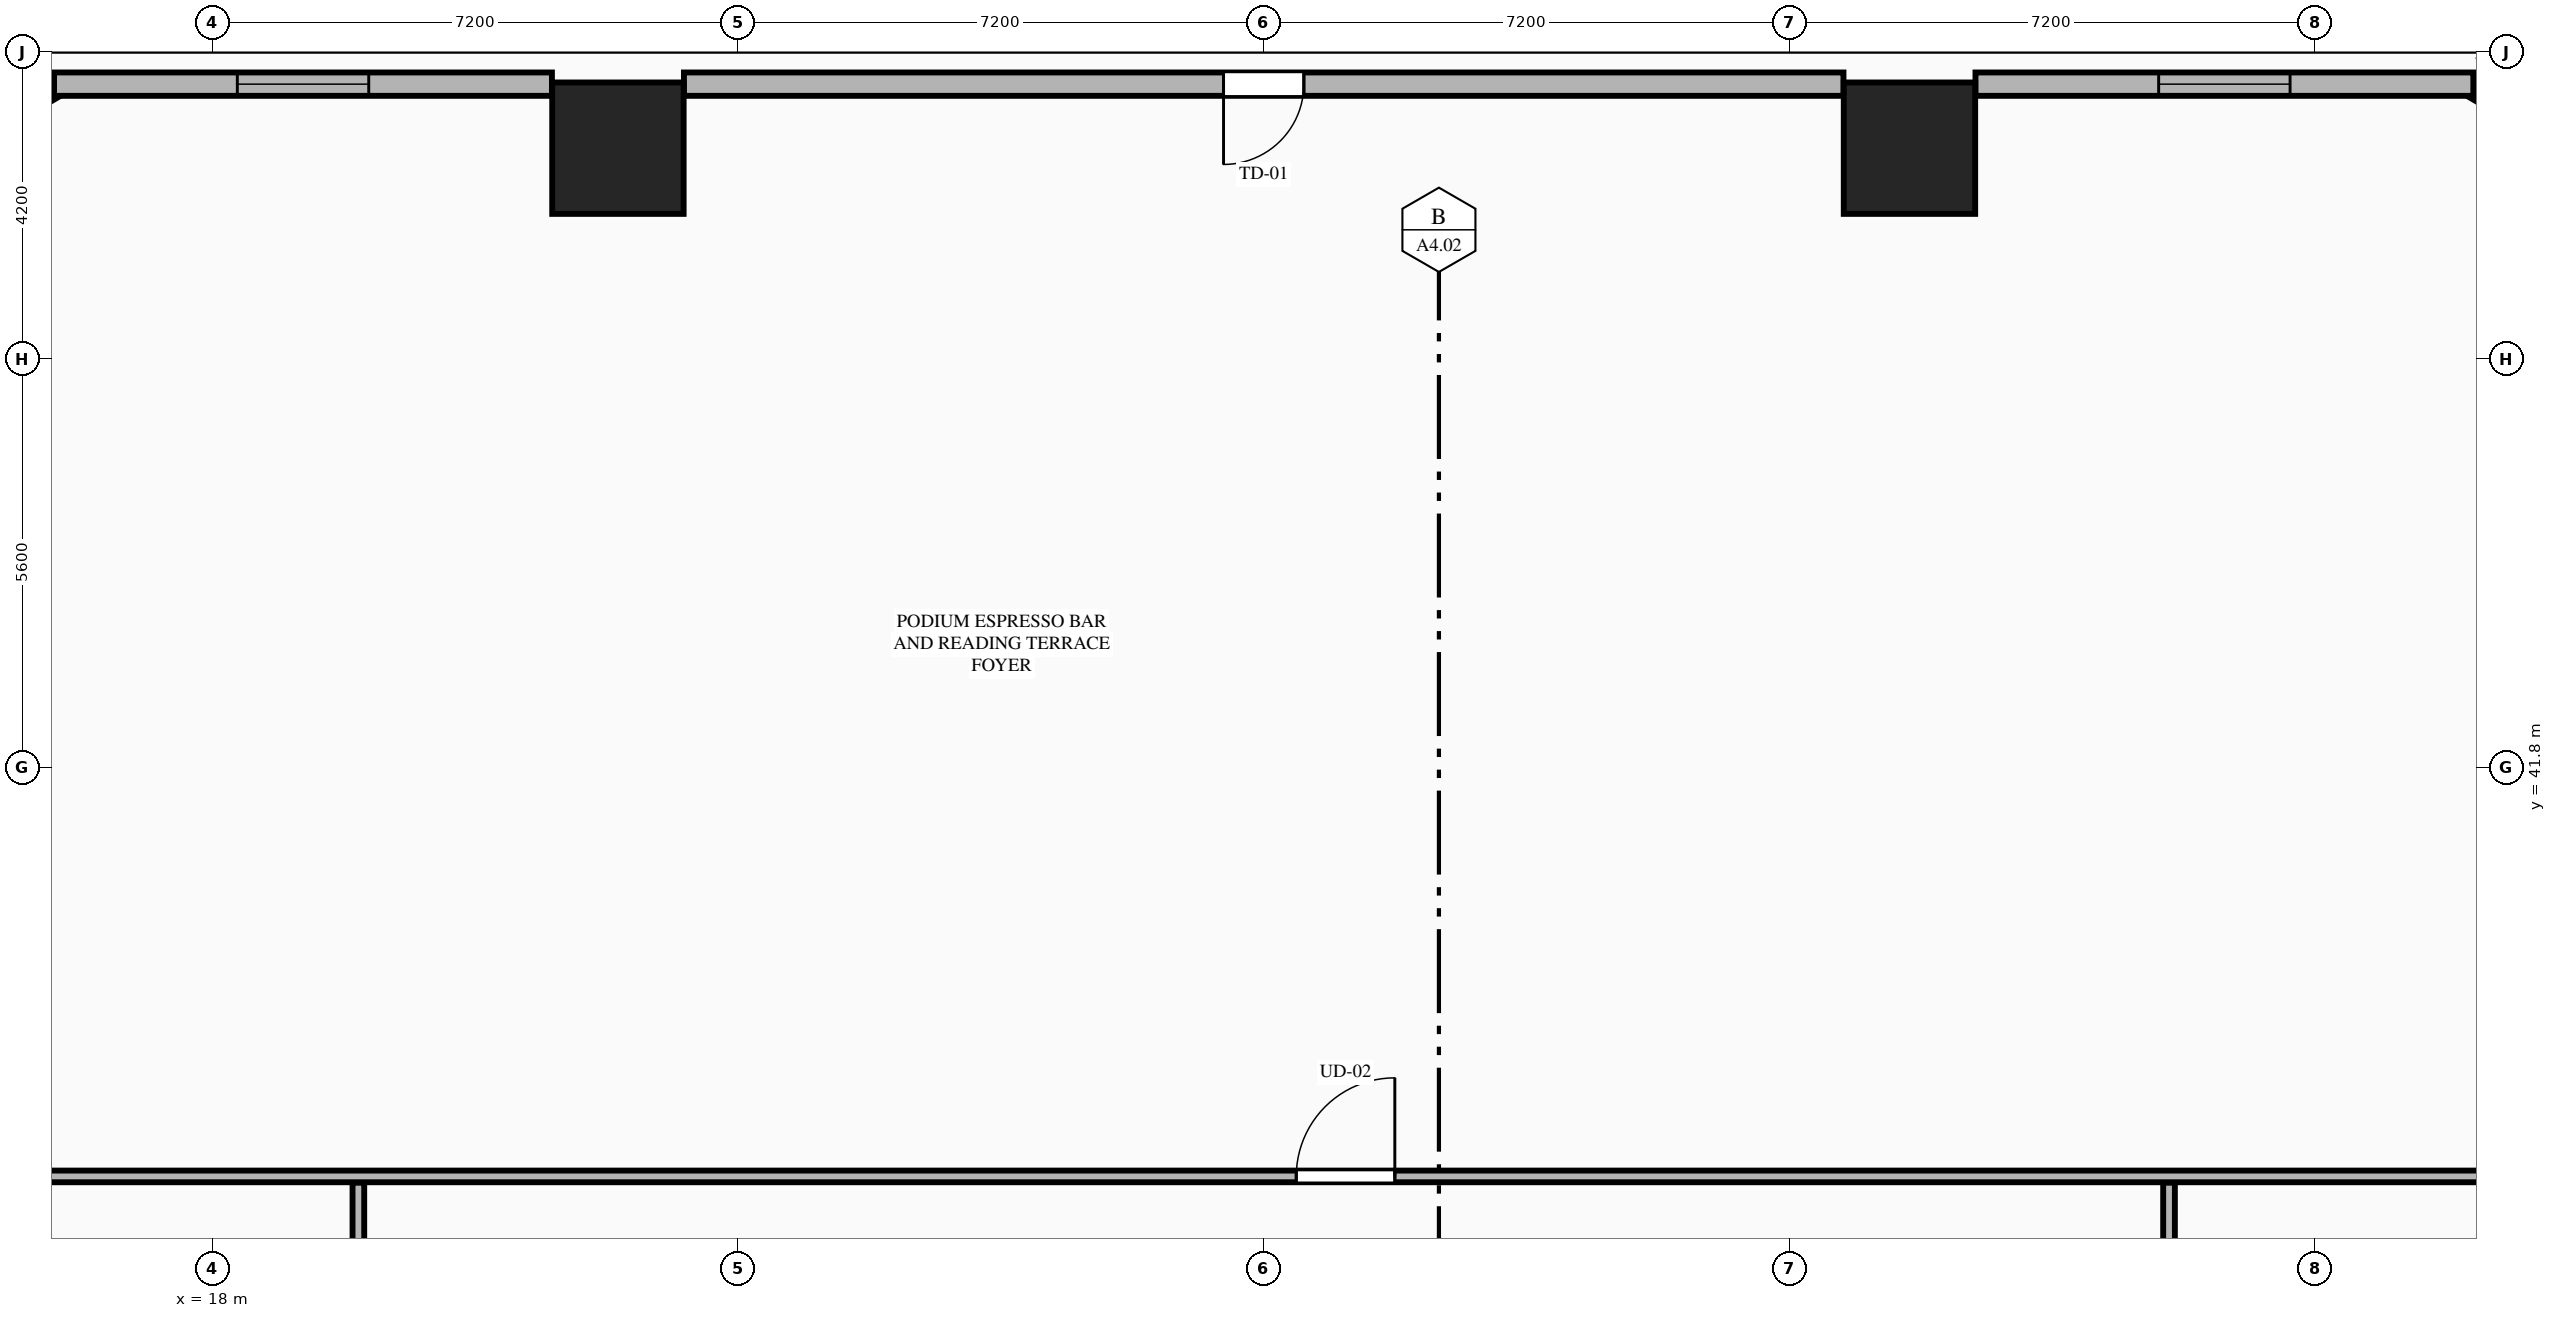
"""IFC4 building model, lengths in metres.
Left out: names, types, materials, properties, quantities, classifications, styles, units other than length and angle.
Written with IfcOpenShell. Run it as: python <this file> out.ifc"""

import sys

from ifc_helpers import new_model, si_unit, direction, frame, frame_2d, origin, origin_2d, place, context, subcontext, project, spatial, rectangle, extrude, element, fill, save


model = new_model("IFC4")
c1 = context("Model", 3, precision=1e-05, world=origin(), true_north=direction((0.0, 1.0)))
c2 = subcontext(c1, "Body", "Model", "MODEL_VIEW")
j1 = project(units=[si_unit("LENGTHUNIT", "METRE"), si_unit("PLANEANGLEUNIT", "RADIAN")], contexts=[c1])
p1 = place(None, origin())
s1 = spatial("IfcSite", under=j1, at=p1, CompositionType="ELEMENT")
p2 = place(p1, origin())
s2 = spatial("IfcBuilding", under=s1, at=p2, CompositionType="ELEMENT")
p3 = place(p2, frame((0.0, 0.0, 6.0)))
s3 = spatial("IfcBuildingStorey", under=s2, at=p3, CompositionType="ELEMENT", Elevation=6.0)
for number, where, z_axis, x_axis in (
    (1, (41.245, 50.283, 0.0), (0.0, 0.0, 1.0), (1.0, 0.0, 0.0)),
    (2, (23.555, 50.283, 0.0), (0.0, 0.0, 1.0), (1.0, 0.0, 0.0)),
):
    element("IfcColumn", number, at=place(p3, frame(where, z_axis=z_axis, x_axis=x_axis)), inside=s3, PredefinedType="COLUMN", context=c2, shape_type="SweptSolid", body=[
        extrude(rectangle(XDim=1.8, YDim=1.8, at=origin_2d()), origin(), (0.0, 0.0, 1.0), 4.5),
    ])
p4 = place(p3, frame((20.0, 17.8, 0.0), z_axis=(0.0, 0.0, 1.0), x_axis=(0.0, 1.0, 0.0)))
e3 = element("IfcWall", 3, at=p4, inside=s3, PredefinedType="PARTITIONING", context=c2, shape_type="SweptSolid", body=[
    extrude(rectangle(XDim=18.315, YDim=0.16, at=frame_2d((9.157, 0.0))), origin(), (0.0, 0.0, 1.0), 4.25),
])
p5 = place(p4, frame((3.8, 0.0, 0.0)))
e4 = element("IfcOpeningElement", 4, at=p5, cuts=e3, PredefinedType="OPENING", context=c2, shape_type="SweptSolid", body=[
    extrude(rectangle(XDim=1.35, YDim=2.35, at=frame_2d((0.675, 1.175))), frame((0.0, 0.09, 0.0), z_axis=(0.0, -1.0, 0.0), x_axis=(1.0, 0.0, 0.0)), (0.0, 0.0, 1.0), 0.18),
])
p6 = place(p4, frame((13.0, 0.0, 0.0)))
e5 = element("IfcOpeningElement", 5, at=p6, cuts=e3, PredefinedType="OPENING", context=c2, shape_type="SweptSolid", body=[
    extrude(rectangle(XDim=1.02, YDim=2.25, at=frame_2d((0.51, 1.125))), frame((0.0, 0.09, 0.0), z_axis=(0.0, -1.0, 0.0), x_axis=(1.0, 0.0, 0.0)), (0.0, 0.0, 1.0), 0.18),
])
p7 = place(p3, frame((44.8, 17.8, 0.0), z_axis=(0.0, 0.0, 1.0), x_axis=(0.0, 1.0, 0.0)))
e6 = element("IfcWall", 6, at=p7, inside=s3, PredefinedType="PARTITIONING", context=c2, shape_type="SweptSolid", body=[
    extrude(rectangle(XDim=18.315, YDim=0.16, at=frame_2d((9.157, 0.0))), origin(), (0.0, 0.0, 1.0), 4.25),
])
p8 = place(p7, frame((3.8, 0.0, 0.0)))
e7 = element("IfcOpeningElement", 7, at=p8, cuts=e6, PredefinedType="OPENING", context=c2, shape_type="SweptSolid", body=[
    extrude(rectangle(XDim=1.35, YDim=2.35, at=frame_2d((0.675, 1.175))), frame((0.0, 0.09, 0.0), z_axis=(0.0, -1.0, 0.0), x_axis=(1.0, 0.0, 0.0)), (0.0, 0.0, 1.0), 0.18),
])
p9 = place(p7, frame((13.8, 0.0, 0.0)))
e8 = element("IfcOpeningElement", 8, at=p9, cuts=e6, PredefinedType="OPENING", context=c2, shape_type="SweptSolid", body=[
    extrude(rectangle(XDim=0.86, YDim=2.1, at=frame_2d((0.43, 1.05))), frame((0.0, 0.09, 0.0), z_axis=(0.0, -1.0, 0.0), x_axis=(1.0, 0.0, 0.0)), (0.0, 0.0, 1.0), 0.18),
])
p10 = place(p7, frame((16.3, 0.0, 0.0)))
e9 = element("IfcOpeningElement", 9, at=p10, cuts=e6, PredefinedType="OPENING", context=c2, shape_type="SweptSolid", body=[
    extrude(rectangle(XDim=0.96, YDim=2.15, at=frame_2d((0.48, 1.075))), frame((0.0, 0.09, 0.0), z_axis=(0.0, -1.0, 0.0), x_axis=(1.0, 0.0, 0.0)), (0.0, 0.0, 1.0), 0.18),
])
p11 = place(p3, frame((6.346, 36.2, 0.0), z_axis=(0.0, 0.0, 1.0), x_axis=(1.0, 0.0, 0.0)))
e10 = element("IfcWall", 10, at=p11, inside=s3, PredefinedType="PARTITIONING", context=c2, shape_type="SweptSolid", body=[
    extrude(rectangle(XDim=52.108, YDim=0.16, at=frame_2d((26.054, 0.0))), origin(), (0.0, 0.0, 1.0), 4.25),
])
p12 = place(p11, frame((6.5, 0.0, 0.0)))
e11 = element("IfcOpeningElement", 11, at=p12, cuts=e10, PredefinedType="OPENING", context=c2, shape_type="SweptSolid", body=[
    extrude(rectangle(XDim=1.35, YDim=2.35, at=frame_2d((0.675, 1.175))), frame((0.0, 0.09, 0.0), z_axis=(0.0, -1.0, 0.0), x_axis=(1.0, 0.0, 0.0)), (0.0, 0.0, 1.0), 0.18),
])
p13 = place(p11, frame((26.5, 0.0, 0.0)))
e12 = element("IfcOpeningElement", 12, at=p13, cuts=e10, PredefinedType="OPENING", context=c2, shape_type="SweptSolid", body=[
    extrude(rectangle(XDim=1.35, YDim=2.35, at=frame_2d((0.675, 1.175))), frame((0.0, 0.09, 0.0), z_axis=(0.0, -1.0, 0.0), x_axis=(1.0, 0.0, 0.0)), (0.0, 0.0, 1.0), 0.18),
])
p14 = place(p3, frame((50.903, 49.992, 0.0), z_axis=(0.0, 0.0, 1.0), x_axis=(-0.861209017918, 0.508250949293, 0.0)))
e13 = element("IfcWall", 13, at=p14, inside=s3, PredefinedType="STANDARD", context=c2, shape_type="SweptSolid", body=[
    extrude(rectangle(XDim=2.253, YDim=0.32, at=frame_2d((1.126, 0.0))), origin(), (0.0, 0.0, 1.0), 4.25),
])
p15 = place(p3, frame((15.837, 51.137, 0.0), z_axis=(0.0, 0.0, 1.0), x_axis=(-0.861181020205, -0.508298387209, 0.0)))
e14 = element("IfcWall", 14, at=p15, inside=s3, PredefinedType="STANDARD", context=c2, shape_type="SweptSolid", body=[
    extrude(rectangle(XDim=2.253, YDim=0.32, at=frame_2d((1.126, 0.0))), origin(), (0.0, 0.0, 1.0), 4.25),
])
p16 = place(p3, frame((48.968, 51.16, 0.0), z_axis=(0.0, 0.0, 1.0), x_axis=(-1.0, 0.0, 0.0)))
e15 = element("IfcWall", 15, at=p16, inside=s3, PredefinedType="STANDARD", context=c2, shape_type="SweptSolid", body=[
    extrude(rectangle(XDim=6.819, YDim=0.32, at=frame_2d((3.41, 0.0))), origin(), (0.0, 0.0, 1.0), 4.25),
])
p17 = place(p16, frame((2.51, 0.0, 0.75)))
e16 = element("IfcOpeningElement", 16, at=p17, cuts=e15, PredefinedType="OPENING", context=c2, shape_type="SweptSolid", body=[
    extrude(rectangle(XDim=1.8, YDim=2.4, at=frame_2d((0.9, 1.2))), frame((0.0, 0.17, 0.0), z_axis=(0.0, -1.0, 0.0), x_axis=(1.0, 0.0, 0.0)), (0.0, 0.0, 1.0), 0.34),
])
p18 = place(p3, frame((40.341, 51.16, 0.0), z_axis=(0.0, 0.0, 1.0), x_axis=(-1.0, 0.0, 0.0)))
e17 = element("IfcWall", 17, at=p18, inside=s3, PredefinedType="STANDARD", context=c2, shape_type="SweptSolid", body=[
    extrude(rectangle(XDim=15.882, YDim=0.32, at=frame_2d((7.941, 0.0))), origin(), (0.0, 0.0, 1.0), 4.25),
])
p19 = place(p18, frame((7.391, 0.0, 0.0)))
e18 = element("IfcOpeningElement", 18, at=p19, cuts=e17, PredefinedType="OPENING", context=c2, shape_type="SweptSolid", body=[
    extrude(rectangle(XDim=1.1, YDim=2.25, at=frame_2d((0.55, 1.125))), frame((0.0, 0.17, 0.0), z_axis=(0.0, -1.0, 0.0), x_axis=(1.0, 0.0, 0.0)), (0.0, 0.0, 1.0), 0.34),
])
p20 = place(p3, frame((22.651, 51.16, 0.0), z_axis=(0.0, 0.0, 1.0), x_axis=(-1.0, 0.0, 0.0)))
e19 = element("IfcWall", 19, at=p20, inside=s3, PredefinedType="STANDARD", context=c2, shape_type="SweptSolid", body=[
    extrude(rectangle(XDim=6.819, YDim=0.32, at=frame_2d((3.409, 0.0))), origin(), (0.0, 0.0, 1.0), 4.25),
])
p21 = place(p20, frame((2.509, 0.0, 0.75)))
e20 = element("IfcOpeningElement", 20, at=p21, cuts=e19, PredefinedType="OPENING", context=c2, shape_type="SweptSolid", body=[
    extrude(rectangle(XDim=1.8, YDim=2.4, at=frame_2d((0.9, 1.2))), frame((0.0, 0.17, 0.0), z_axis=(0.0, -1.0, 0.0), x_axis=(1.0, 0.0, 0.0)), (0.0, 0.0, 1.0), 0.34),
])
p22 = place(p13, origin())
e21 = element("IfcDoor", 21, at=p22, inside=s3, OperationType="SINGLE_SWING_RIGHT", PredefinedType="DOOR", context=c2, shape_type="SweptSolid", body=[
    extrude(rectangle(XDim=1.35, YDim=2.35, at=frame_2d((0.675, 1.175))), frame((0.0, 0.025, 0.0), z_axis=(0.0, -1.0, 0.0), x_axis=(1.0, 0.0, 0.0)), (0.0, 0.0, 1.0), 0.05),
])
fill(e12, e21)
p23 = place(p17, origin())
e22 = element("IfcWindow", 22, at=p23, inside=s3, PartitioningType="SINGLE_PANEL", PredefinedType="WINDOW", context=c2, shape_type="SweptSolid", body=[
    extrude(rectangle(XDim=1.8, YDim=2.4, at=frame_2d((0.9, 1.2))), frame((0.0, 0.03, 0.0), z_axis=(0.0, -1.0, 0.0), x_axis=(1.0, 0.0, 0.0)), (0.0, 0.0, 1.0), 0.06),
])
fill(e16, e22)
p24 = place(p19, origin())
e23 = element("IfcDoor", 23, at=p24, inside=s3, OperationType="SINGLE_SWING_RIGHT", PredefinedType="DOOR", context=c2, shape_type="SweptSolid", body=[
    extrude(rectangle(XDim=1.1, YDim=2.25, at=frame_2d((0.55, 1.125))), frame((0.0, 0.025, 0.0), z_axis=(0.0, -1.0, 0.0), x_axis=(1.0, 0.0, 0.0)), (0.0, 0.0, 1.0), 0.05),
])
fill(e18, e23)
p25 = place(p21, origin())
e24 = element("IfcWindow", 24, at=p25, inside=s3, PartitioningType="SINGLE_PANEL", PredefinedType="WINDOW", context=c2, shape_type="SweptSolid", body=[
    extrude(rectangle(XDim=1.8, YDim=2.4, at=frame_2d((0.9, 1.2))), frame((0.0, 0.03, 0.0), z_axis=(0.0, -1.0, 0.0), x_axis=(1.0, 0.0, 0.0)), (0.0, 0.0, 1.0), 0.06),
])
fill(e20, e24)
save(model, sys.argv[1])
